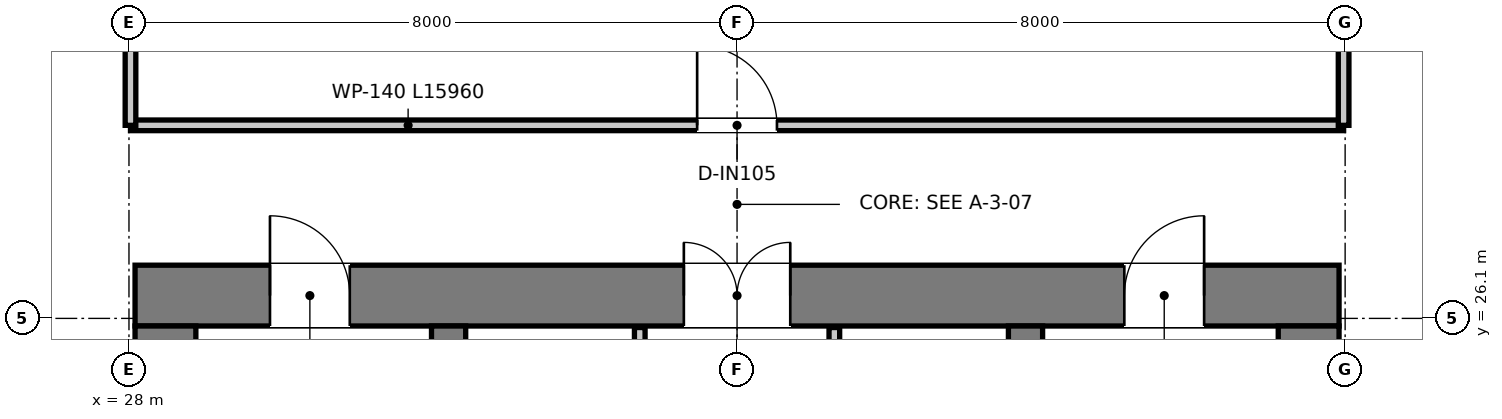
"""IFC4 building model, lengths in metres.
Left out: names, types, materials, properties, quantities, classifications, styles, units other than length and angle.
Written with IfcOpenShell. Run it as: python <this file> out.ifc"""

import sys

from ifc_helpers import new_model, si_unit, direction, frame, frame_2d, origin, place, context, subcontext, project, spatial, rectangle, extrude, element, fill, save


model = new_model("IFC4")
c1 = context("Model", 3, precision=1e-05, world=origin(), true_north=direction((0.0, 1.0)))
c2 = subcontext(c1, "Body", "Model", "MODEL_VIEW")
j1 = project(units=[si_unit("LENGTHUNIT", "METRE"), si_unit("PLANEANGLEUNIT", "RADIAN")], contexts=[c1])
p1 = place(None, origin())
s1 = spatial("IfcSite", under=j1, at=p1, CompositionType="ELEMENT")
p2 = place(p1, origin())
s2 = spatial("IfcBuilding", under=s1, at=p2, CompositionType="ELEMENT")
p3 = place(p2, frame((0.0, 0.0, 101.9)))
s3 = spatial("IfcBuildingStorey", under=s2, at=p3, CompositionType="ELEMENT", Elevation=101.9)
p4 = place(p3, frame((28.08, 26.4, 0.0), z_axis=(0.0, 0.0, 1.0), x_axis=(1.0, 0.0, 0.0)))
e1 = element("IfcWall", 1, at=p4, inside=s3, PredefinedType="SHEAR", context=c2, shape_type="SweptSolid", body=[
    extrude(rectangle(XDim=15.84, YDim=0.8, at=frame_2d((7.92, 0.0))), origin(), (0.0, 0.0, 1.0), 3.95),
])
p5 = place(p4, frame((7.22, 0.0, 0.0)))
e2 = element("IfcOpeningElement", 2, at=p5, cuts=e1, PredefinedType="OPENING", context=c2, shape_type="SweptSolid", body=[
    extrude(rectangle(XDim=1.4, YDim=2.2, at=frame_2d((0.7, 1.1))), frame((0.0, 0.41, 0.0), z_axis=(0.0, -1.0, 0.0), x_axis=(1.0, 0.0, 0.0)), (0.0, 0.0, 1.0), 0.82),
])
p6 = place(p4, frame((1.775, 0.0, 0.0)))
e3 = element("IfcOpeningElement", 3, at=p6, cuts=e1, PredefinedType="OPENING", context=c2, shape_type="SweptSolid", body=[
    extrude(rectangle(XDim=1.05, YDim=2.1, at=frame_2d((0.525, 1.05))), frame((0.0, 0.41, 0.0), z_axis=(0.0, -1.0, 0.0), x_axis=(1.0, 0.0, 0.0)), (0.0, 0.0, 1.0), 0.82),
])
p7 = place(p4, frame((13.015, 0.0, 0.0)))
e4 = element("IfcOpeningElement", 4, at=p7, cuts=e1, PredefinedType="OPENING", context=c2, shape_type="SweptSolid", body=[
    extrude(rectangle(XDim=1.05, YDim=2.1, at=frame_2d((0.525, 1.05))), frame((0.0, 0.41, 0.0), z_axis=(0.0, -1.0, 0.0), x_axis=(1.0, 0.0, 0.0)), (0.0, 0.0, 1.0), 0.82),
])
for number, where, z_axis, x_axis in (
    (5, (28.48, 11.3, 0.0), (0.0, 0.0, 1.0), (0.0, 1.0, 0.0)),
    (6, (43.52, 11.3, 0.0), (0.0, 0.0, 1.0), (0.0, 1.0, 0.0)),
):
    element("IfcWall", number, at=place(p3, frame(where, z_axis=z_axis, x_axis=x_axis)), inside=s3, PredefinedType="SHEAR", context=c2, shape_type="SweptSolid", body=[
        extrude(rectangle(XDim=14.7, YDim=0.8, at=frame_2d((7.35, 0.0))), origin(), (0.0, 0.0, 1.0), 3.95),
    ])
p8 = place(p3, frame((32.205, 13.22, 0.0), z_axis=(0.0, 0.0, 1.0), x_axis=(0.0, 1.0, 0.0)))
e7 = element("IfcWall", 7, at=p8, inside=s3, PredefinedType="SHEAR", context=c2, shape_type="SweptSolid", body=[
    extrude(rectangle(XDim=12.78, YDim=0.45, at=frame_2d((6.39, 0.0))), origin(), (0.0, 0.0, 1.0), 3.95),
])
p9 = place(p8, frame((10.58, 0.0, 0.0)))
e8 = element("IfcOpeningElement", 8, at=p9, cuts=e7, PredefinedType="OPENING", context=c2, shape_type="SweptSolid", body=[
    extrude(rectangle(XDim=1.1, YDim=2.15, at=frame_2d((0.55, 1.075))), frame((0.0, 0.235, 0.0), z_axis=(0.0, -1.0, 0.0), x_axis=(1.0, 0.0, 0.0)), (0.0, 0.0, 1.0), 0.47),
])
p10 = place(p3, frame((39.795, 13.22, 0.0), z_axis=(0.0, 0.0, 1.0), x_axis=(0.0, 1.0, 0.0)))
e9 = element("IfcWall", 9, at=p10, inside=s3, PredefinedType="SHEAR", context=c2, shape_type="SweptSolid", body=[
    extrude(rectangle(XDim=12.78, YDim=0.45, at=frame_2d((6.39, 0.0))), origin(), (0.0, 0.0, 1.0), 3.95),
])
p11 = place(p10, frame((10.58, 0.0, 0.0)))
e10 = element("IfcOpeningElement", 10, at=p11, cuts=e9, PredefinedType="OPENING", context=c2, shape_type="SweptSolid", body=[
    extrude(rectangle(XDim=1.1, YDim=2.15, at=frame_2d((0.55, 1.075))), frame((0.0, 0.235, 0.0), z_axis=(0.0, -1.0, 0.0), x_axis=(1.0, 0.0, 0.0)), (0.0, 0.0, 1.0), 0.47),
])
p12 = place(p3, frame((34.72, 20.2, 0.0), z_axis=(0.0, 0.0, 1.0), x_axis=(0.0, 1.0, 0.0)))
e11 = element("IfcWall", 11, at=p12, inside=s3, PredefinedType="PARTITIONING", context=c2, shape_type="SweptSolid", body=[
    extrude(rectangle(XDim=5.78, YDim=0.14, at=frame_2d((2.89, 0.0))), origin(), (0.0, 0.0, 1.0), 2.67),
])
p13 = place(p12, frame((1.05, 0.0, 0.0)))
e12 = element("IfcOpeningElement", 12, at=p13, cuts=e11, PredefinedType="OPENING", context=c2, shape_type="SweptSolid", body=[
    extrude(rectangle(XDim=0.9, YDim=2.1, at=frame_2d((0.45, 1.05))), frame((0.0, 0.08, 0.0), z_axis=(0.0, -1.0, 0.0), x_axis=(1.0, 0.0, 0.0)), (0.0, 0.0, 1.0), 0.16),
])
p14 = place(p3, frame((37.28, 20.2, 0.0), z_axis=(0.0, 0.0, 1.0), x_axis=(0.0, 1.0, 0.0)))
e13 = element("IfcWall", 13, at=p14, inside=s3, PredefinedType="PARTITIONING", context=c2, shape_type="SweptSolid", body=[
    extrude(rectangle(XDim=5.78, YDim=0.14, at=frame_2d((2.89, 0.0))), origin(), (0.0, 0.0, 1.0), 2.67),
])
p15 = place(p14, frame((0.95, 0.0, 0.0)))
e14 = element("IfcOpeningElement", 14, at=p15, cuts=e13, PredefinedType="OPENING", context=c2, shape_type="SweptSolid", body=[
    extrude(rectangle(XDim=1.1, YDim=2.15, at=frame_2d((0.55, 1.075))), frame((0.0, 0.08, 0.0), z_axis=(0.0, -1.0, 0.0), x_axis=(1.0, 0.0, 0.0)), (0.0, 0.0, 1.0), 0.16),
])
p16 = place(p3, frame((28.02, 28.64, 0.0), z_axis=(0.0, 0.0, 1.0), x_axis=(1.0, 0.0, 0.0)))
e15 = element("IfcWall", 15, at=p16, inside=s3, PredefinedType="PARTITIONING", context=c2, shape_type="SweptSolid", body=[
    extrude(rectangle(XDim=15.96, YDim=0.14, at=frame_2d((7.98, 0.0))), origin(), (0.0, 0.0, 1.0), 3.08),
])
p17 = place(p16, frame((7.455, 0.0, 0.0)))
e16 = element("IfcOpeningElement", 16, at=p17, cuts=e15, PredefinedType="OPENING", context=c2, shape_type="SweptSolid", body=[
    extrude(rectangle(XDim=1.05, YDim=2.15, at=frame_2d((0.525, 1.075))), frame((0.0, 0.08, 0.0), z_axis=(0.0, -1.0, 0.0), x_axis=(1.0, 0.0, 0.0)), (0.0, 0.0, 1.0), 0.16),
])
for number, where, z_axis, x_axis in (
    (17, (28.02, 28.64, 0.0), (0.0, 0.0, 1.0), (0.0, 1.0, 0.0)),
    (18, (43.98, 28.64, 0.0), (0.0, 0.0, 1.0), (0.0, 1.0, 0.0)),
):
    element("IfcWall", number, at=place(p3, frame(where, z_axis=z_axis, x_axis=x_axis)), inside=s3, PredefinedType="PARTITIONING", context=c2, shape_type="SweptSolid", body=[
        extrude(rectangle(XDim=5.74, YDim=0.14, at=frame_2d((2.87, 0.0))), origin(), (0.0, 0.0, 1.0), 3.27),
    ])
p18 = place(p5, origin())
e19 = element("IfcDoor", 19, at=p18, inside=s3, OperationType="DOUBLE_DOOR_SINGLE_SWING", PredefinedType="DOOR", context=c2, shape_type="SweptSolid", body=[
    extrude(rectangle(XDim=1.4, YDim=2.2, at=frame_2d((0.7, 1.1))), frame((0.0, 0.025, 0.0), z_axis=(0.0, -1.0, 0.0), x_axis=(1.0, 0.0, 0.0)), (0.0, 0.0, 1.0), 0.05),
])
fill(e2, e19)
p19 = place(p6, origin())
e20 = element("IfcDoor", 20, at=p19, inside=s3, OperationType="SINGLE_SWING_LEFT", PredefinedType="DOOR", context=c2, shape_type="SweptSolid", body=[
    extrude(rectangle(XDim=1.05, YDim=2.1, at=frame_2d((0.525, 1.05))), frame((0.0, 0.025, 0.0), z_axis=(0.0, -1.0, 0.0), x_axis=(1.0, 0.0, 0.0)), (0.0, 0.0, 1.0), 0.05),
])
fill(e3, e20)
p20 = place(p7, origin())
e21 = element("IfcDoor", 21, at=p20, inside=s3, OperationType="SINGLE_SWING_RIGHT", PredefinedType="DOOR", context=c2, shape_type="SweptSolid", body=[
    extrude(rectangle(XDim=1.05, YDim=2.1, at=frame_2d((0.525, 1.05))), frame((0.0, 0.025, 0.0), z_axis=(0.0, -1.0, 0.0), x_axis=(1.0, 0.0, 0.0)), (0.0, 0.0, 1.0), 0.05),
])
fill(e4, e21)
p21 = place(p17, origin())
e22 = element("IfcDoor", 22, at=p21, inside=s3, OperationType="SINGLE_SWING_LEFT", PredefinedType="DOOR", context=c2, shape_type="SweptSolid", body=[
    extrude(rectangle(XDim=1.05, YDim=2.15, at=frame_2d((0.525, 1.075))), frame((0.0, 0.025, 0.0), z_axis=(0.0, -1.0, 0.0), x_axis=(1.0, 0.0, 0.0)), (0.0, 0.0, 1.0), 0.05),
])
fill(e16, e22)
save(model, sys.argv[1])
